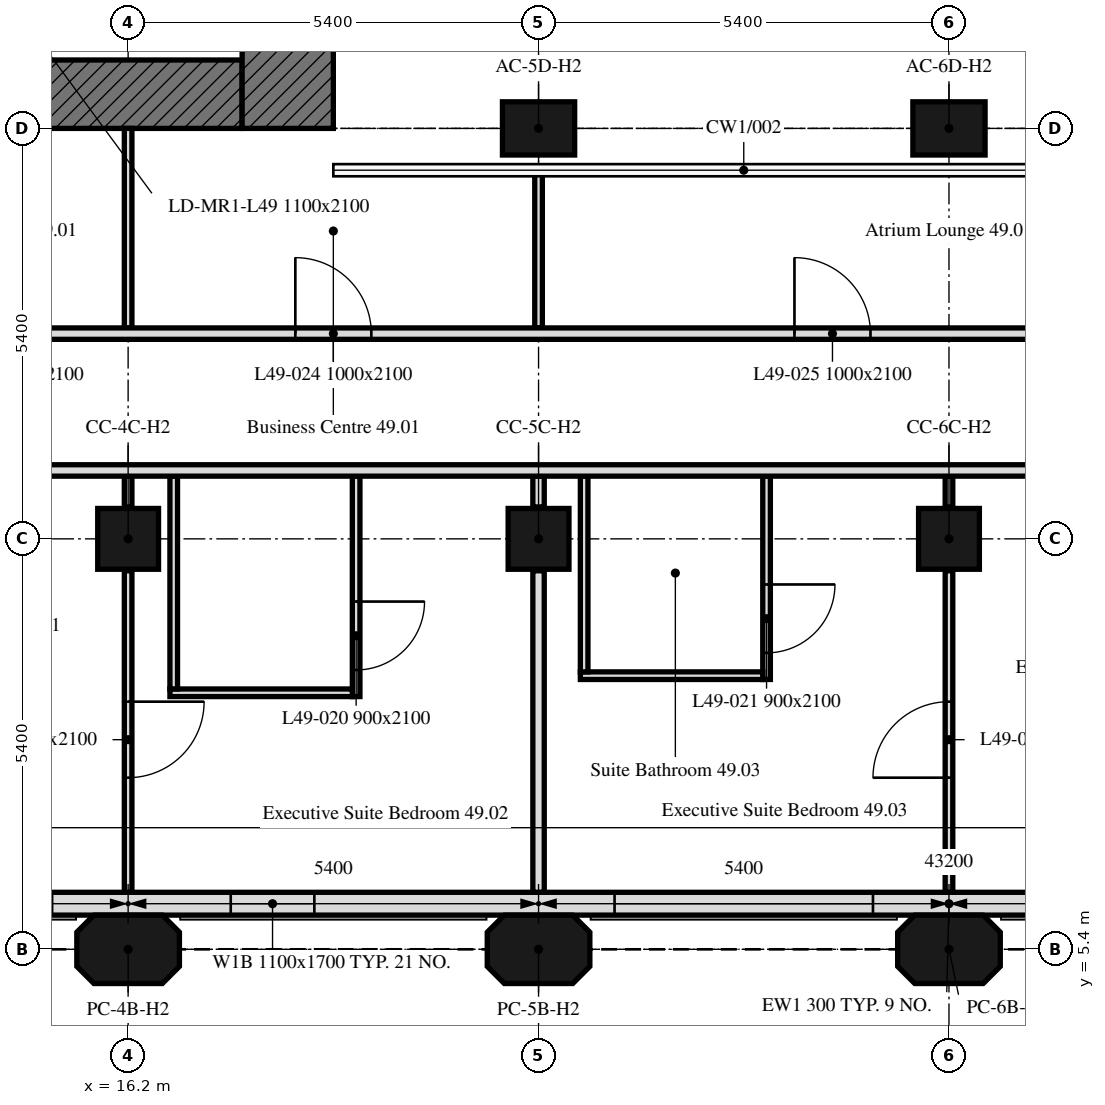
"""IFC4 building model, lengths in metres.
Left out: names, types, materials, properties, quantities, classifications, styles, units other than length and angle.
Written with IfcOpenShell. Run it as: python <this file> out.ifc"""

import sys

from ifc_helpers import new_model, si_unit, direction, frame, frame_2d, origin, origin_2d, place, context, subcontext, project, spatial, polyline, rectangle, outline, extrude, element, fill, save


model = new_model("IFC4")
c1 = context("Model", 3, precision=1e-05, world=origin(), true_north=direction((0.0, 1.0)))
c2 = subcontext(c1, "Body", "Model", "MODEL_VIEW")
j1 = project(units=[si_unit("LENGTHUNIT", "METRE"), si_unit("PLANEANGLEUNIT", "RADIAN")], contexts=[c1])
p1 = place(None, origin())
s1 = spatial("IfcSite", under=j1, at=p1, CompositionType="ELEMENT")
p2 = place(p1, origin())
s2 = spatial("IfcBuilding", under=s1, at=p2, CompositionType="ELEMENT")
p3 = place(p2, frame((0.0, 0.0, 200.5)))
s3 = spatial("IfcBuildingStorey", under=s2, at=p3, CompositionType="ELEMENT", Elevation=200.5)
for number, where, z_axis, x_axis in (
    (1, (16.2, 5.4, 0.0), (0.0, 0.0, 1.0), (1.0, 0.0, 0.0)),
    (2, (21.6, 5.4, 0.0), (0.0, 0.0, 1.0), (1.0, 0.0, 0.0)),
    (3, (27.0, 5.4, 0.0), (0.0, 0.0, 1.0), (1.0, 0.0, 0.0)),
):
    element("IfcColumn", number, at=place(p3, frame(where, z_axis=z_axis, x_axis=x_axis)), inside=s3, PredefinedType="COLUMN", context=c2, shape_type="SweptSolid", body=[
        extrude(outline(polyline([(-0.45, -0.45), (0.45, -0.45), (0.675, -0.225), (0.675, 0.225), (0.45, 0.45), (-0.45, 0.45), (-0.675, 0.225), (-0.675, -0.225), (-0.45, -0.45)])), origin(), (0.0, 0.0, 1.0), 3.0),
    ])
for number, where, z_axis, x_axis in (
    (4, (16.2, 10.8, 0.0), (0.0, 0.0, 1.0), (1.0, 0.0, 0.0)),
    (5, (21.6, 10.8, 0.0), (0.0, 0.0, 1.0), (1.0, 0.0, 0.0)),
    (6, (27.0, 10.8, 0.0), (0.0, 0.0, 1.0), (1.0, 0.0, 0.0)),
):
    element("IfcColumn", number, at=place(p3, frame(where, z_axis=z_axis, x_axis=x_axis)), inside=s3, PredefinedType="COLUMN", context=c2, shape_type="SweptSolid", body=[
        extrude(rectangle(XDim=0.8, YDim=0.8, at=origin_2d()), origin(), (0.0, 0.0, 1.0), 3.0),
    ])
for number, where, z_axis, x_axis in (
    (7, (21.6, 16.2, 0.0), (0.0, 0.0, 1.0), (1.0, 0.0, 0.0)),
    (8, (27.0, 16.2, 0.0), (0.0, 0.0, 1.0), (1.0, 0.0, 0.0)),
):
    element("IfcColumn", number, at=place(p3, frame(where, z_axis=z_axis, x_axis=x_axis)), inside=s3, PredefinedType="COLUMN", context=c2, shape_type="SweptSolid", body=[
        extrude(rectangle(XDim=0.95, YDim=0.7, at=origin_2d()), origin(), (0.0, 0.0, 1.0), 3.0),
    ])
p4 = place(p3, frame((10.986, 6.0, 0.0), z_axis=(0.0, 0.0, 1.0), x_axis=(1.0, 0.0, 0.0)))
e9 = element("IfcWall", 9, at=p4, inside=s3, PredefinedType="SOLIDWALL", context=c2, shape_type="SweptSolid", body=[
    extrude(rectangle(XDim=32.027, YDim=0.3, at=frame_2d((16.014, 0.0))), origin(), (0.0, 0.0, 1.0), 3.0),
])
p5 = place(p4, frame((0.814, 0.0, 0.9)))
e10 = element("IfcOpeningElement", 10, at=p5, cuts=e9, PredefinedType="OPENING", context=c2, shape_type="SweptSolid", body=[
    extrude(rectangle(XDim=3.4, YDim=1.7, at=frame_2d((1.7, 0.85))), frame((0.0, 0.16, 0.0), z_axis=(0.0, -1.0, 0.0), x_axis=(1.0, 0.0, 0.0)), (0.0, 0.0, 1.0), 0.32),
])
p6 = place(p4, frame((6.564, 0.0, 0.9)))
e11 = element("IfcOpeningElement", 11, at=p6, cuts=e9, PredefinedType="OPENING", context=c2, shape_type="SweptSolid", body=[
    extrude(rectangle(XDim=1.1, YDim=1.7, at=frame_2d((0.55, 0.85))), frame((0.0, 0.16, 0.0), z_axis=(0.0, -1.0, 0.0), x_axis=(1.0, 0.0, 0.0)), (0.0, 0.0, 1.0), 0.32),
])
p7 = place(p4, frame((11.614, 0.0, 0.9)))
e12 = element("IfcOpeningElement", 12, at=p7, cuts=e9, PredefinedType="OPENING", context=c2, shape_type="SweptSolid", body=[
    extrude(rectangle(XDim=3.4, YDim=1.7, at=frame_2d((1.7, 0.85))), frame((0.0, 0.16, 0.0), z_axis=(0.0, -1.0, 0.0), x_axis=(1.0, 0.0, 0.0)), (0.0, 0.0, 1.0), 0.32),
])
p8 = place(p4, frame((17.364, 0.0, 0.9)))
e13 = element("IfcOpeningElement", 13, at=p8, cuts=e9, PredefinedType="OPENING", context=c2, shape_type="SweptSolid", body=[
    extrude(rectangle(XDim=1.1, YDim=1.7, at=frame_2d((0.55, 0.85))), frame((0.0, 0.16, 0.0), z_axis=(0.0, -1.0, 0.0), x_axis=(1.0, 0.0, 0.0)), (0.0, 0.0, 1.0), 0.32),
])
p9 = place(p4, frame((22.414, 0.0, 0.9)))
e14 = element("IfcOpeningElement", 14, at=p9, cuts=e9, PredefinedType="OPENING", context=c2, shape_type="SweptSolid", body=[
    extrude(rectangle(XDim=3.4, YDim=1.7, at=frame_2d((1.7, 0.85))), frame((0.0, 0.16, 0.0), z_axis=(0.0, -1.0, 0.0), x_axis=(1.0, 0.0, 0.0)), (0.0, 0.0, 1.0), 0.32),
])
p10 = place(p4, frame((28.164, 0.0, 0.9)))
e15 = element("IfcOpeningElement", 15, at=p10, cuts=e9, PredefinedType="OPENING", context=c2, shape_type="SweptSolid", body=[
    extrude(rectangle(XDim=1.1, YDim=1.7, at=frame_2d((0.55, 0.85))), frame((0.0, 0.16, 0.0), z_axis=(0.0, -1.0, 0.0), x_axis=(1.0, 0.0, 0.0)), (0.0, 0.0, 1.0), 0.32),
])
p11 = place(p3, frame((17.7, 16.65, 0.0), z_axis=(0.0, 0.0, 1.0), x_axis=(-1.0, 0.0, 0.0)))
e16 = element("IfcWall", 16, at=p11, inside=s3, PredefinedType="SOLIDWALL", context=c2, shape_type="SweptSolid", body=[
    extrude(rectangle(XDim=11.1, YDim=0.9, at=frame_2d((5.55, 0.0))), origin(), (0.0, 0.0, 1.0), 3.0),
])
p12 = place(p11, frame((5.55, 0.0, 0.0)))
e17 = element("IfcOpeningElement", 17, at=p12, cuts=e16, PredefinedType="OPENING", context=c2, shape_type="SweptSolid", body=[
    extrude(rectangle(XDim=2.0, YDim=2.4, at=frame_2d((1.0, 1.2))), frame((0.0, 0.45, 0.0), z_axis=(0.0, -1.0, 0.0), x_axis=(1.0, 0.0, 0.0)), (0.0, 0.0, 1.0), 0.9),
])
p13 = place(p3, frame((18.3, 32.4, 0.0), z_axis=(0.0, 0.0, 1.0), x_axis=(0.0, -1.0, 0.0)))
e18 = element("IfcWall", 18, at=p13, inside=s3, PredefinedType="SOLIDWALL", context=c2, shape_type="SweptSolid", body=[
    extrude(rectangle(XDim=16.2, YDim=1.2, at=frame_2d((8.1, 0.0))), origin(), (0.0, 0.0, 1.0), 3.0),
])
p14 = place(p3, frame((21.6, 6.151, 0.0), z_axis=(0.0, 0.0, 1.0), x_axis=(0.0, 1.0, 0.0)))
e19 = element("IfcWall", 19, at=p14, inside=s3, PredefinedType="PARTITIONING", context=c2, shape_type="SweptSolid", body=[
    extrude(rectangle(XDim=4.229, YDim=0.15, at=frame_2d((2.115, 0.0))), origin(), (0.0, 0.0, 1.0), 3.0),
])
p15 = place(p3, frame((21.6, 11.22, 0.0), z_axis=(0.0, 0.0, 1.0), x_axis=(0.0, 1.0, 0.0)))
e20 = element("IfcWall", 20, at=p15, inside=s3, PredefinedType="PARTITIONING", context=c2, shape_type="SweptSolid", body=[
    extrude(rectangle(XDim=0.405, YDim=0.15, at=frame_2d((0.203, 0.0))), origin(), (0.0, 0.0, 1.0), 3.0),
])
p16 = place(p3, frame((19.2, 11.625, 0.0), z_axis=(0.0, 0.0, 1.0), x_axis=(0.0, -1.0, 0.0)))
e21 = element("IfcWall", 21, at=p16, inside=s3, PredefinedType="PARTITIONING", context=c2, shape_type="SweptSolid", body=[
    extrude(rectangle(XDim=2.9, YDim=0.1, at=frame_2d((1.45, 0.0))), origin(), (0.0, 0.0, 1.0), 3.0),
])
p17 = place(p16, frame((1.65, 0.0, 0.0)))
e22 = element("IfcOpeningElement", 22, at=p17, cuts=e21, PredefinedType="OPENING", context=c2, shape_type="SweptSolid", body=[
    extrude(rectangle(XDim=0.9, YDim=2.1, at=frame_2d((0.45, 1.05))), frame((0.0, 0.05, 0.0), z_axis=(0.0, -1.0, 0.0), x_axis=(1.0, 0.0, 0.0)), (0.0, 0.0, 1.0), 0.1),
])
p18 = place(p3, frame((19.15, 8.775, 0.0), z_axis=(0.0, 0.0, 1.0), x_axis=(-1.0, 0.0, 0.0)))
e23 = element("IfcWall", 23, at=p18, inside=s3, PredefinedType="PARTITIONING", context=c2, shape_type="SweptSolid", body=[
    extrude(rectangle(XDim=2.4, YDim=0.1, at=frame_2d((1.2, 0.0))), origin(), (0.0, 0.0, 1.0), 3.0),
])
p19 = place(p3, frame((16.8, 8.825, 0.0), z_axis=(0.0, 0.0, 1.0), x_axis=(0.0, 1.0, 0.0)))
e24 = element("IfcWall", 24, at=p19, inside=s3, PredefinedType="PARTITIONING", context=c2, shape_type="SweptSolid", body=[
    extrude(rectangle(XDim=2.8, YDim=0.1, at=frame_2d((1.4, 0.0))), origin(), (0.0, 0.0, 1.0), 3.0),
])
p20 = place(p3, frame((16.2, 11.625, 0.0), z_axis=(0.0, 0.0, 1.0), x_axis=(0.0, -1.0, 0.0)))
e25 = element("IfcWall", 25, at=p20, inside=s3, PredefinedType="PARTITIONING", context=c2, shape_type="SweptSolid", body=[
    extrude(rectangle(XDim=0.405, YDim=0.1, at=frame_2d((0.203, 0.0))), origin(), (0.0, 0.0, 1.0), 3.0),
])
p21 = place(p3, frame((16.2, 10.38, 0.0), z_axis=(0.0, 0.0, 1.0), x_axis=(0.0, -1.0, 0.0)))
e26 = element("IfcWall", 26, at=p21, inside=s3, PredefinedType="PARTITIONING", context=c2, shape_type="SweptSolid", body=[
    extrude(rectangle(XDim=4.229, YDim=0.1, at=frame_2d((2.115, 0.0))), origin(), (0.0, 0.0, 1.0), 3.0),
])
p22 = place(p21, frame((1.722, 0.0, 0.0)))
e27 = element("IfcOpeningElement", 27, at=p22, cuts=e26, PredefinedType="OPENING", context=c2, shape_type="SweptSolid", body=[
    extrude(rectangle(XDim=1.0, YDim=2.1, at=frame_2d((0.5, 1.05))), frame((0.0, 0.05, 0.0), z_axis=(0.0, -1.0, 0.0), x_axis=(1.0, 0.0, 0.0)), (0.0, 0.0, 1.0), 0.1),
])
p23 = place(p3, frame((27.0, 6.151, 0.0), z_axis=(0.0, 0.0, 1.0), x_axis=(0.0, 1.0, 0.0)))
e28 = element("IfcWall", 28, at=p23, inside=s3, PredefinedType="PARTITIONING", context=c2, shape_type="SweptSolid", body=[
    extrude(rectangle(XDim=4.229, YDim=0.1, at=frame_2d((2.115, 0.0))), origin(), (0.0, 0.0, 1.0), 3.0),
])
p24 = place(p23, frame((1.507, 0.0, 0.0)))
e29 = element("IfcOpeningElement", 29, at=p24, cuts=e28, PredefinedType="OPENING", context=c2, shape_type="SweptSolid", body=[
    extrude(rectangle(XDim=1.0, YDim=2.1, at=frame_2d((0.5, 1.05))), frame((0.0, 0.05, 0.0), z_axis=(0.0, -1.0, 0.0), x_axis=(1.0, 0.0, 0.0)), (0.0, 0.0, 1.0), 0.1),
])
p25 = place(p3, frame((27.0, 11.22, 0.0), z_axis=(0.0, 0.0, 1.0), x_axis=(0.0, 1.0, 0.0)))
e30 = element("IfcWall", 30, at=p25, inside=s3, PredefinedType="PARTITIONING", context=c2, shape_type="SweptSolid", body=[
    extrude(rectangle(XDim=0.405, YDim=0.1, at=frame_2d((0.203, 0.0))), origin(), (0.0, 0.0, 1.0), 3.0),
])
p26 = place(p3, frame((24.6, 11.625, 0.0), z_axis=(0.0, 0.0, 1.0), x_axis=(0.0, -1.0, 0.0)))
e31 = element("IfcWall", 31, at=p26, inside=s3, PredefinedType="PARTITIONING", context=c2, shape_type="SweptSolid", body=[
    extrude(rectangle(XDim=2.675, YDim=0.1, at=frame_2d((1.337, 0.0))), origin(), (0.0, 0.0, 1.0), 3.0),
])
p27 = place(p26, frame((1.425, 0.0, 0.0)))
e32 = element("IfcOpeningElement", 32, at=p27, cuts=e31, PredefinedType="OPENING", context=c2, shape_type="SweptSolid", body=[
    extrude(rectangle(XDim=0.9, YDim=2.1, at=frame_2d((0.45, 1.05))), frame((0.0, 0.05, 0.0), z_axis=(0.0, -1.0, 0.0), x_axis=(1.0, 0.0, 0.0)), (0.0, 0.0, 1.0), 0.1),
])
p28 = place(p3, frame((24.55, 9.0, 0.0), z_axis=(0.0, 0.0, 1.0), x_axis=(-1.0, 0.0, 0.0)))
e33 = element("IfcWall", 33, at=p28, inside=s3, PredefinedType="PARTITIONING", context=c2, shape_type="SweptSolid", body=[
    extrude(rectangle(XDim=2.4, YDim=0.1, at=frame_2d((1.2, 0.0))), origin(), (0.0, 0.0, 1.0), 3.0),
])
p29 = place(p3, frame((22.2, 9.05, 0.0), z_axis=(0.0, 0.0, 1.0), x_axis=(0.0, 1.0, 0.0)))
e34 = element("IfcWall", 34, at=p29, inside=s3, PredefinedType="PARTITIONING", context=c2, shape_type="SweptSolid", body=[
    extrude(rectangle(XDim=2.575, YDim=0.1, at=frame_2d((1.288, 0.0))), origin(), (0.0, 0.0, 1.0), 3.0),
])
p30 = place(p3, frame((6.151, 11.7, 0.0), z_axis=(0.0, 0.0, 1.0), x_axis=(1.0, 0.0, 0.0)))
e35 = element("IfcWall", 35, at=p30, inside=s3, PredefinedType="PARTITIONING", context=c2, shape_type="SweptSolid", body=[
    extrude(rectangle(XDim=41.698, YDim=0.15, at=frame_2d((20.849, 0.0))), origin(), (0.0, 0.0, 1.0), 3.0),
])
p31 = place(p30, frame((37.954, 0.0, 0.0)))
e36 = element("IfcOpeningElement", 36, at=p31, cuts=e35, PredefinedType="OPENING", context=c2, shape_type="SweptSolid", body=[
    extrude(rectangle(XDim=1.0, YDim=2.1, at=frame_2d((0.5, 1.05))), frame((0.0, 0.075, 0.0), z_axis=(0.0, -1.0, 0.0), x_axis=(1.0, 0.0, 0.0)), (0.0, 0.0, 1.0), 0.15),
])
p32 = place(p30, frame((6.849, 0.0, 0.0)))
e37 = element("IfcOpeningElement", 37, at=p32, cuts=e35, PredefinedType="OPENING", context=c2, shape_type="SweptSolid", body=[
    extrude(rectangle(XDim=1.0, YDim=2.1, at=frame_2d((0.5, 1.05))), frame((0.0, 0.075, 0.0), z_axis=(0.0, -1.0, 0.0), x_axis=(1.0, 0.0, 0.0)), (0.0, 0.0, 1.0), 0.15),
])
p33 = place(p30, frame((23.049, 0.0, 0.0)))
e38 = element("IfcOpeningElement", 38, at=p33, cuts=e35, PredefinedType="OPENING", context=c2, shape_type="SweptSolid", body=[
    extrude(rectangle(XDim=1.0, YDim=2.1, at=frame_2d((0.5, 1.05))), frame((0.0, 0.075, 0.0), z_axis=(0.0, -1.0, 0.0), x_axis=(1.0, 0.0, 0.0)), (0.0, 0.0, 1.0), 0.15),
])
p34 = place(p3, frame((16.2, 16.2, 0.0), z_axis=(0.0, 0.0, 1.0), x_axis=(0.0, -1.0, 0.0)))
e39 = element("IfcWall", 39, at=p34, inside=s3, PredefinedType="PARTITIONING", context=c2, shape_type="SweptSolid", body=[
    extrude(rectangle(XDim=2.625, YDim=0.1, at=frame_2d((1.312, 0.0))), origin(), (0.0, 0.0, 1.0), 3.0),
])
p35 = place(p3, frame((21.6, 13.575, 0.0), z_axis=(0.0, 0.0, 1.0), x_axis=(0.0, 1.0, 0.0)))
e40 = element("IfcWall", 40, at=p35, inside=s3, PredefinedType="PARTITIONING", context=c2, shape_type="SweptSolid", body=[
    extrude(rectangle(XDim=2.13, YDim=0.1, at=frame_2d((1.065, 0.0))), origin(), (0.0, 0.0, 1.0), 3.0),
])
p36 = place(p3, frame((6.151, 13.5, 0.0), z_axis=(0.0, 0.0, 1.0), x_axis=(1.0, 0.0, 0.0)))
e41 = element("IfcWall", 41, at=p36, inside=s3, PredefinedType="PARTITIONING", context=c2, shape_type="SweptSolid", body=[
    extrude(rectangle(XDim=36.974, YDim=0.15, at=frame_2d((18.487, 0.0))), origin(), (0.0, 0.0, 1.0), 3.0),
])
p37 = place(p36, frame((12.249, 0.0, 0.0)))
e42 = element("IfcOpeningElement", 42, at=p37, cuts=e41, PredefinedType="OPENING", context=c2, shape_type="SweptSolid", body=[
    extrude(rectangle(XDim=1.0, YDim=2.1, at=frame_2d((0.5, 1.05))), frame((0.0, 0.075, 0.0), z_axis=(0.0, -1.0, 0.0), x_axis=(1.0, 0.0, 0.0)), (0.0, 0.0, 1.0), 0.15),
])
p38 = place(p36, frame((18.816, 0.0, 0.0)))
e43 = element("IfcOpeningElement", 43, at=p38, cuts=e41, PredefinedType="OPENING", context=c2, shape_type="SweptSolid", body=[
    extrude(rectangle(XDim=1.0, YDim=2.1, at=frame_2d((0.5, 1.05))), frame((0.0, 0.075, 0.0), z_axis=(0.0, -1.0, 0.0), x_axis=(1.0, 0.0, 0.0)), (0.0, 0.0, 1.0), 0.15),
])
p39 = place(p36, frame((2.029, 0.0, 0.0)))
e44 = element("IfcOpeningElement", 44, at=p39, cuts=e41, PredefinedType="OPENING", context=c2, shape_type="SweptSolid", body=[
    extrude(rectangle(XDim=1.0, YDim=2.1, at=frame_2d((0.5, 1.05))), frame((0.0, 0.075, 0.0), z_axis=(0.0, -1.0, 0.0), x_axis=(1.0, 0.0, 0.0)), (0.0, 0.0, 1.0), 0.15),
])
p40 = place(p36, frame((27.374, 0.0, 0.0)))
e45 = element("IfcOpeningElement", 45, at=p40, cuts=e41, PredefinedType="OPENING", context=c2, shape_type="SweptSolid", body=[
    extrude(rectangle(XDim=1.0, YDim=2.1, at=frame_2d((0.5, 1.05))), frame((0.0, 0.075, 0.0), z_axis=(0.0, -1.0, 0.0), x_axis=(1.0, 0.0, 0.0)), (0.0, 0.0, 1.0), 0.15),
])
p41 = place(p36, frame((34.574, 0.0, 0.0)))
e46 = element("IfcOpeningElement", 46, at=p41, cuts=e41, PredefinedType="OPENING", context=c2, shape_type="SweptSolid", body=[
    extrude(rectangle(XDim=1.0, YDim=2.1, at=frame_2d((0.5, 1.05))), frame((0.0, 0.075, 0.0), z_axis=(0.0, -1.0, 0.0), x_axis=(1.0, 0.0, 0.0)), (0.0, 0.0, 1.0), 0.15),
])
p42 = place(p36, frame((7.924, 0.0, 0.0)))
e47 = element("IfcOpeningElement", 47, at=p42, cuts=e41, PredefinedType="OPENING", context=c2, shape_type="SweptSolid", body=[
    extrude(rectangle(XDim=1.0, YDim=2.1, at=frame_2d((0.5, 1.05))), frame((0.0, 0.075, 0.0), z_axis=(0.0, -1.0, 0.0), x_axis=(1.0, 0.0, 0.0)), (0.0, 0.0, 1.0), 0.15),
])
p43 = place(p36, frame((4.699, 0.0, 0.0)))
e48 = element("IfcOpeningElement", 48, at=p43, cuts=e41, PredefinedType="OPENING", context=c2, shape_type="SweptSolid", body=[
    extrude(rectangle(XDim=1.8, YDim=2.4, at=frame_2d((0.9, 1.2))), frame((0.0, 0.075, 0.0), z_axis=(0.0, -1.0, 0.0), x_axis=(1.0, 0.0, 0.0)), (0.0, 0.0, 1.0), 0.15),
])
p44 = place(p36, frame((29.799, 0.0, 0.0)))
e49 = element("IfcOpeningElement", 49, at=p44, cuts=e41, PredefinedType="OPENING", context=c2, shape_type="SweptSolid", body=[
    extrude(rectangle(XDim=1.8, YDim=2.4, at=frame_2d((0.9, 1.2))), frame((0.0, 0.075, 0.0), z_axis=(0.0, -1.0, 0.0), x_axis=(1.0, 0.0, 0.0)), (0.0, 0.0, 1.0), 0.15),
])
p45 = place(p6, origin())
e50 = element("IfcWindow", 50, at=p45, inside=s3, PartitioningType="SINGLE_PANEL", PredefinedType="WINDOW", context=c2, shape_type="SweptSolid", body=[
    extrude(rectangle(XDim=1.1, YDim=1.7, at=frame_2d((0.55, 0.85))), frame((0.0, 0.03, 0.0), z_axis=(0.0, -1.0, 0.0), x_axis=(1.0, 0.0, 0.0)), (0.0, 0.0, 1.0), 0.06),
])
fill(e11, e50)
p46 = place(p7, origin())
e51 = element("IfcWindow", 51, at=p46, inside=s3, PartitioningType="SINGLE_PANEL", PredefinedType="WINDOW", context=c2, shape_type="SweptSolid", body=[
    extrude(rectangle(XDim=3.4, YDim=1.7, at=frame_2d((1.7, 0.85))), frame((0.0, 0.03, 0.0), z_axis=(0.0, -1.0, 0.0), x_axis=(1.0, 0.0, 0.0)), (0.0, 0.0, 1.0), 0.06),
])
fill(e12, e51)
p47 = place(p17, origin())
e52 = element("IfcDoor", 52, at=p47, inside=s3, OperationType="SINGLE_SWING_RIGHT", PredefinedType="DOOR", context=c2, shape_type="SweptSolid", body=[
    extrude(rectangle(XDim=0.9, YDim=2.1, at=frame_2d((0.45, 1.05))), frame((0.0, 0.025, 0.0), z_axis=(0.0, -1.0, 0.0), x_axis=(1.0, 0.0, 0.0)), (0.0, 0.0, 1.0), 0.05),
])
fill(e22, e52)
p48 = place(p27, origin())
e53 = element("IfcDoor", 53, at=p48, inside=s3, OperationType="SINGLE_SWING_LEFT", PredefinedType="DOOR", context=c2, shape_type="SweptSolid", body=[
    extrude(rectangle(XDim=0.9, YDim=2.1, at=frame_2d((0.45, 1.05))), frame((0.0, 0.025, 0.0), z_axis=(0.0, -1.0, 0.0), x_axis=(1.0, 0.0, 0.0)), (0.0, 0.0, 1.0), 0.05),
])
fill(e32, e53)
p49 = place(p37, origin())
e54 = element("IfcDoor", 54, at=p49, inside=s3, OperationType="SINGLE_SWING_RIGHT", PredefinedType="DOOR", context=c2, shape_type="SweptSolid", body=[
    extrude(rectangle(XDim=1.0, YDim=2.1, at=frame_2d((0.5, 1.05))), frame((0.0, 0.025, 0.0), z_axis=(0.0, -1.0, 0.0), x_axis=(1.0, 0.0, 0.0)), (0.0, 0.0, 1.0), 0.05),
])
fill(e42, e54)
p50 = place(p38, origin())
e55 = element("IfcDoor", 55, at=p50, inside=s3, OperationType="SINGLE_SWING_RIGHT", PredefinedType="DOOR", context=c2, shape_type="SweptSolid", body=[
    extrude(rectangle(XDim=1.0, YDim=2.1, at=frame_2d((0.5, 1.05))), frame((0.0, 0.025, 0.0), z_axis=(0.0, -1.0, 0.0), x_axis=(1.0, 0.0, 0.0)), (0.0, 0.0, 1.0), 0.05),
])
fill(e43, e55)
p51 = place(p22, origin())
e56 = element("IfcDoor", 56, at=p51, inside=s3, OperationType="SINGLE_SWING_LEFT", PredefinedType="DOOR", context=c2, shape_type="SweptSolid", body=[
    extrude(rectangle(XDim=1.0, YDim=2.1, at=frame_2d((0.5, 1.05))), frame((0.0, 0.025, 0.0), z_axis=(0.0, -1.0, 0.0), x_axis=(1.0, 0.0, 0.0)), (0.0, 0.0, 1.0), 0.05),
])
fill(e27, e56)
p52 = place(p24, origin())
e57 = element("IfcDoor", 57, at=p52, inside=s3, OperationType="SINGLE_SWING_LEFT", PredefinedType="DOOR", context=c2, shape_type="SweptSolid", body=[
    extrude(rectangle(XDim=1.0, YDim=2.1, at=frame_2d((0.5, 1.05))), frame((0.0, 0.025, 0.0), z_axis=(0.0, -1.0, 0.0), x_axis=(1.0, 0.0, 0.0)), (0.0, 0.0, 1.0), 0.05),
])
fill(e29, e57)
save(model, sys.argv[1])
